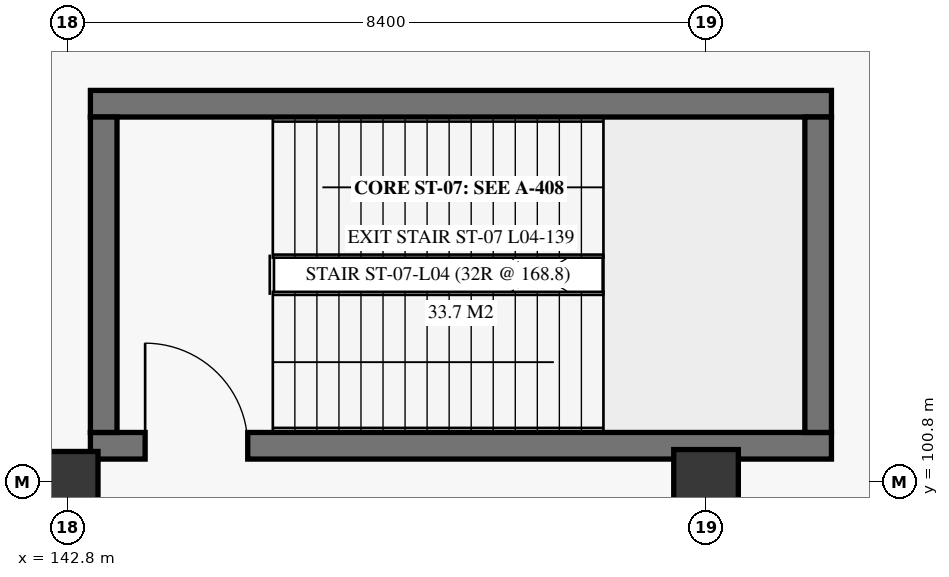
"""IFC4 building model, lengths in metres.
Left out: names, types, materials, properties, quantities, classifications, styles, units other than length and angle.
Written with IfcOpenShell. Run it as: python <this file> out.ifc"""

import sys

from ifc_helpers import new_model, si_unit, direction, frame, frame_2d, origin, origin_2d, place, context, subcontext, project, spatial, rectangle, extrude, element, fill, save


model = new_model("IFC4")
c1 = context("Model", 3, precision=1e-05, world=origin(), true_north=direction((0.0, 1.0)))
c2 = subcontext(c1, "Body", "Model", "MODEL_VIEW")
j1 = project(units=[si_unit("LENGTHUNIT", "METRE"), si_unit("PLANEANGLEUNIT", "RADIAN")], contexts=[c1])
p1 = place(None, origin())
s1 = spatial("IfcSite", under=j1, at=p1, CompositionType="ELEMENT")
p2 = place(p1, origin())
s2 = spatial("IfcBuilding", under=s1, at=p2, CompositionType="ELEMENT")
p3 = place(p2, frame((0.0, 0.0, 16.8)))
s3 = spatial("IfcBuildingStorey", under=s2, at=p3, CompositionType="ELEMENT", Elevation=16.8)
p4 = place(p3, frame((142.8, 100.8, 0.0), z_axis=(0.0, 0.0, 1.0), x_axis=(1.0, 0.0, 0.0)))
e1 = element("IfcColumn", 1, at=p4, inside=s3, PredefinedType="COLUMN", context=c2, shape_type="SweptSolid", body=[
    extrude(rectangle(XDim=0.8, YDim=0.8, at=origin_2d()), origin(), (0.0, 0.0, 1.0), 5.1),
])
p5 = place(p3, frame((151.2, 100.8, 0.0), z_axis=(0.0, 0.0, 1.0), x_axis=(1.0, 0.0, 0.0)))
e2 = element("IfcColumn", 2, at=p5, inside=s3, PredefinedType="COLUMN", context=c2, shape_type="SweptSolid", body=[
    extrude(rectangle(XDim=0.85, YDim=0.85, at=origin_2d()), origin(), (0.0, 0.0, 1.0), 5.1),
])
p6 = place(p3, frame((143.1, 101.275, 0.0), z_axis=(0.0, 0.0, 1.0), x_axis=(1.0, 0.0, 0.0)))
e3 = element("IfcWall", 3, at=p6, inside=s3, PredefinedType="SHEAR", context=c2, shape_type="SweptSolid", body=[
    extrude(rectangle(XDim=9.75, YDim=0.35, at=frame_2d((4.875, 0.0))), origin(), (0.0, 0.0, 1.0), 5.1),
])
p7 = place(p6, frame((0.72, 0.0, 0.0)))
e4 = element("IfcOpeningElement", 4, at=p7, cuts=e3, PredefinedType="OPENING", context=c2, shape_type="SweptSolid", body=[
    extrude(rectangle(XDim=1.35, YDim=2.25, at=frame_2d((0.675, 1.125))), frame((0.0, 0.185, 0.0), z_axis=(0.0, -1.0, 0.0), x_axis=(1.0, 0.0, 0.0)), (0.0, 0.0, 1.0), 0.37),
])
p8 = place(p3, frame((143.1, 105.775, 0.0), z_axis=(0.0, 0.0, 1.0), x_axis=(1.0, 0.0, 0.0)))
e5 = element("IfcWall", 5, at=p8, inside=s3, PredefinedType="SHEAR", context=c2, shape_type="SweptSolid", body=[
    extrude(rectangle(XDim=9.75, YDim=0.35, at=frame_2d((4.875, 0.0))), origin(), (0.0, 0.0, 1.0), 5.1),
])
for number, where, z_axis, x_axis in (
    (6, (143.275, 101.45, 0.0), (0.0, 0.0, 1.0), (0.0, 1.0, 0.0)),
    (7, (152.675, 101.45, 0.0), (0.0, 0.0, 1.0), (0.0, 1.0, 0.0)),
):
    element("IfcWall", number, at=place(p3, frame(where, z_axis=z_axis, x_axis=x_axis)), inside=s3, PredefinedType="SHEAR", context=c2, shape_type="SweptSolid", body=[
        extrude(rectangle(XDim=4.15, YDim=0.35, at=frame_2d((2.075, 0.0))), origin(), (0.0, 0.0, 1.0), 5.1),
    ])
p9 = place(p7, origin())
e8 = element("IfcDoor", 8, at=p9, inside=s3, OperationType="SINGLE_SWING_LEFT", PredefinedType="DOOR", context=c2, shape_type="SweptSolid", body=[
    extrude(rectangle(XDim=1.35, YDim=2.25, at=frame_2d((0.675, 1.125))), frame((0.0, 0.025, 0.0), z_axis=(0.0, -1.0, 0.0), x_axis=(1.0, 0.0, 0.0)), (0.0, 0.0, 1.0), 0.05),
])
fill(e4, e8)
save(model, sys.argv[1])
